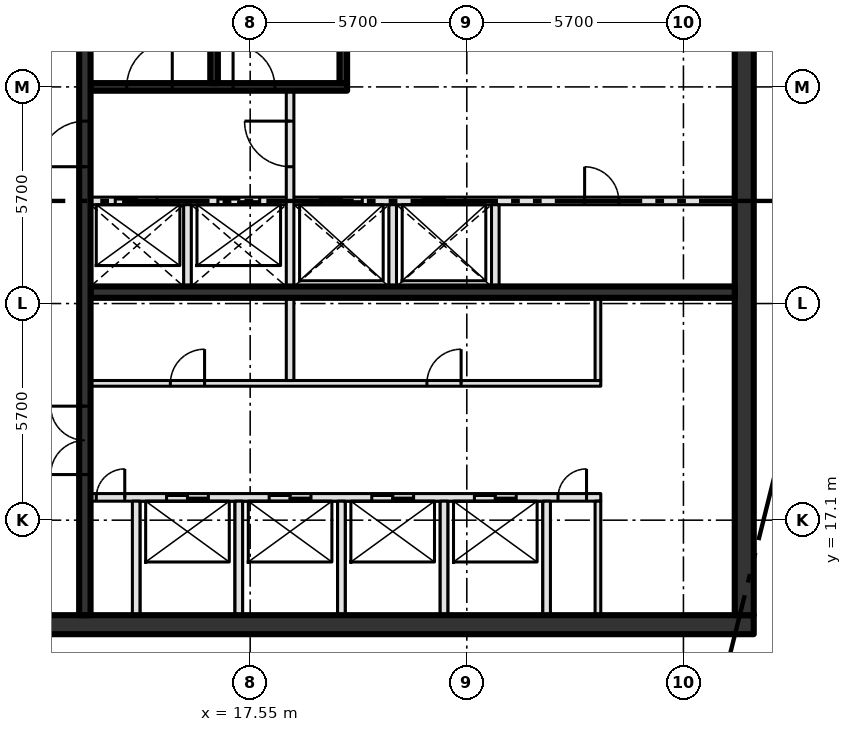
"""IFC4 building model, lengths in metres.
Left out: names, types, materials, properties, quantities, classifications, styles, units other than length and angle.
Written with IfcOpenShell. Run it as: python <this file> out.ifc"""

import sys

from ifc_helpers import new_model, si_unit, direction, frame, frame_2d, origin, place, context, subcontext, project, spatial, rectangle, extrude, element, fill, save


model = new_model("IFC4")
c1 = context("Model", 3, precision=1e-05, world=origin(), true_north=direction((0.0, 1.0)))
c2 = subcontext(c1, "Body", "Model", "MODEL_VIEW")
j1 = project(units=[si_unit("LENGTHUNIT", "METRE"), si_unit("PLANEANGLEUNIT", "RADIAN")], contexts=[c1])
p1 = place(None, origin())
s1 = spatial("IfcSite", under=j1, at=p1, CompositionType="ELEMENT")
p2 = place(p1, origin())
s2 = spatial("IfcBuilding", under=s1, at=p2, CompositionType="ELEMENT")
p3 = place(p2, frame((0.0, 0.0, 348.6)))
s3 = spatial("IfcBuildingStorey", under=s2, at=p3, CompositionType="ELEMENT", Elevation=348.6)
p4 = place(p3, frame((8.0, 14.35, -0.45), z_axis=(0.0, 0.0, 1.0), x_axis=(1.0, 0.0, 0.0)))
e1 = element("IfcWall", 1, at=p4, inside=s3, PredefinedType="SHEAR", context=c2, shape_type="SweptSolid", body=[
    extrude(rectangle(XDim=22.8, YDim=0.5, at=frame_2d((11.4, 0.0))), origin(), (0.0, 0.0, 1.0), 5.55),
])
p5 = place(p4, frame((2.3, 0.0, 0.45)))
e2 = element("IfcOpeningElement", 2, at=p5, cuts=e1, PredefinedType="OPENING", context=c2, shape_type="SweptSolid", body=[
    extrude(rectangle(XDim=1.8, YDim=2.1, at=frame_2d((0.9, 1.05))), frame((0.0, 0.26, 0.0), z_axis=(0.0, -1.0, 0.0), x_axis=(1.0, 0.0, 0.0)), (0.0, 0.0, 1.0), 0.52),
])
p6 = place(p3, frame((30.55, 14.6, -0.45), z_axis=(0.0, 0.0, 1.0), x_axis=(0.0, 1.0, 0.0)))
e3 = element("IfcWall", 3, at=p6, inside=s3, PredefinedType="SHEAR", context=c2, shape_type="SweptSolid", body=[
    extrude(rectangle(XDim=21.1, YDim=0.5, at=frame_2d((10.55, 0.0))), origin(), (0.0, 0.0, 1.0), 5.55),
])
p7 = place(p3, frame((13.35, 17.7, 0.0), z_axis=(0.0, 0.0, 1.0), x_axis=(1.0, 0.0, 0.0)))
e4 = element("IfcWall", 4, at=p7, inside=s3, PredefinedType="SOLIDWALL", context=c2, shape_type="SweptSolid", body=[
    extrude(rectangle(XDim=13.425, YDim=0.2, at=frame_2d((6.712, 0.0))), origin(), (0.0, 0.0, 1.0), 5.1),
])
p8 = place(p7, frame((2.0, 0.0, 0.0)))
e5 = element("IfcOpeningElement", 5, at=p8, cuts=e4, PredefinedType="OPENING", context=c2, shape_type="SweptSolid", body=[
    extrude(rectangle(XDim=1.1, YDim=2.1, at=frame_2d((0.55, 1.05))), frame((0.0, 0.11, 0.0), z_axis=(0.0, -1.0, 0.0), x_axis=(1.0, 0.0, 0.0)), (0.0, 0.0, 1.0), 0.22),
])
p9 = place(p7, frame((4.7, 0.0, 0.0)))
e6 = element("IfcOpeningElement", 6, at=p9, cuts=e4, PredefinedType="OPENING", context=c2, shape_type="SweptSolid", body=[
    extrude(rectangle(XDim=1.1, YDim=2.1, at=frame_2d((0.55, 1.05))), frame((0.0, 0.11, 0.0), z_axis=(0.0, -1.0, 0.0), x_axis=(1.0, 0.0, 0.0)), (0.0, 0.0, 1.0), 0.22),
])
p10 = place(p7, frame((7.4, 0.0, 0.0)))
e7 = element("IfcOpeningElement", 7, at=p10, cuts=e4, PredefinedType="OPENING", context=c2, shape_type="SweptSolid", body=[
    extrude(rectangle(XDim=1.1, YDim=2.1, at=frame_2d((0.55, 1.05))), frame((0.0, 0.11, 0.0), z_axis=(0.0, -1.0, 0.0), x_axis=(1.0, 0.0, 0.0)), (0.0, 0.0, 1.0), 0.22),
])
p11 = place(p7, frame((10.1, 0.0, 0.0)))
e8 = element("IfcOpeningElement", 8, at=p11, cuts=e4, PredefinedType="OPENING", context=c2, shape_type="SweptSolid", body=[
    extrude(rectangle(XDim=1.1, YDim=2.1, at=frame_2d((0.55, 1.05))), frame((0.0, 0.11, 0.0), z_axis=(0.0, -1.0, 0.0), x_axis=(1.0, 0.0, 0.0)), (0.0, 0.0, 1.0), 0.22),
])
p12 = place(p7, frame((0.15, 0.0, 0.0)))
e9 = element("IfcOpeningElement", 9, at=p12, cuts=e4, PredefinedType="OPENING", context=c2, shape_type="SweptSolid", body=[
    extrude(rectangle(XDim=0.75, YDim=2.1, at=frame_2d((0.375, 1.05))), frame((0.0, 0.11, 0.0), z_axis=(0.0, -1.0, 0.0), x_axis=(1.0, 0.0, 0.0)), (0.0, 0.0, 1.0), 0.22),
])
p13 = place(p7, frame((12.3, 0.0, 0.0)))
e10 = element("IfcOpeningElement", 10, at=p13, cuts=e4, PredefinedType="OPENING", context=c2, shape_type="SweptSolid", body=[
    extrude(rectangle(XDim=0.75, YDim=2.1, at=frame_2d((0.375, 1.05))), frame((0.0, 0.11, 0.0), z_axis=(0.0, -1.0, 0.0), x_axis=(1.0, 0.0, 0.0)), (0.0, 0.0, 1.0), 0.22),
])
p14 = place(p3, frame((13.35, 20.7, 0.0), z_axis=(0.0, 0.0, 1.0), x_axis=(1.0, 0.0, 0.0)))
e11 = element("IfcWall", 11, at=p14, inside=s3, PredefinedType="PARTITIONING", context=c2, shape_type="SweptSolid", body=[
    extrude(rectangle(XDim=13.425, YDim=0.15, at=frame_2d((6.712, 0.0))), origin(), (0.0, 0.0, 1.0), 5.1),
])
p15 = place(p14, frame((2.1, 0.0, 0.0)))
e12 = element("IfcOpeningElement", 12, at=p15, cuts=e11, PredefinedType="OPENING", context=c2, shape_type="SweptSolid", body=[
    extrude(rectangle(XDim=0.9, YDim=2.1, at=frame_2d((0.45, 1.05))), frame((0.0, 0.085, 0.0), z_axis=(0.0, -1.0, 0.0), x_axis=(1.0, 0.0, 0.0)), (0.0, 0.0, 1.0), 0.17),
])
p16 = place(p14, frame((8.85, 0.0, 0.0)))
e13 = element("IfcOpeningElement", 13, at=p16, cuts=e11, PredefinedType="OPENING", context=c2, shape_type="SweptSolid", body=[
    extrude(rectangle(XDim=0.9, YDim=2.1, at=frame_2d((0.45, 1.05))), frame((0.0, 0.085, 0.0), z_axis=(0.0, -1.0, 0.0), x_axis=(1.0, 0.0, 0.0)), (0.0, 0.0, 1.0), 0.17),
])
p17 = place(p3, frame((13.35, 23.1, 0.0), z_axis=(0.0, 0.0, 1.0), x_axis=(1.0, 0.0, 0.0)))
e14 = element("IfcWall", 14, at=p17, inside=s3, PredefinedType="SHEAR", context=c2, shape_type="SweptSolid", body=[
    extrude(rectangle(XDim=16.95, YDim=0.3, at=frame_2d((8.475, 0.0))), origin(), (0.0, 0.0, 1.0), 5.1),
])
p18 = place(p3, frame((13.35, 25.5, 0.0), z_axis=(0.0, 0.0, 1.0), x_axis=(1.0, 0.0, 0.0)))
e15 = element("IfcWall", 15, at=p18, inside=s3, PredefinedType="SOLIDWALL", context=c2, shape_type="SweptSolid", body=[
    extrude(rectangle(XDim=16.95, YDim=0.2, at=frame_2d((8.475, 0.0))), origin(), (0.0, 0.0, 1.0), 5.1),
])
p19 = place(p18, frame((0.65, 0.0, 0.0)))
e16 = element("IfcOpeningElement", 16, at=p19, cuts=e15, PredefinedType="OPENING", context=c2, shape_type="SweptSolid", body=[
    extrude(rectangle(XDim=1.1, YDim=2.1, at=frame_2d((0.55, 1.05))), frame((0.0, 0.11, 0.0), z_axis=(0.0, -1.0, 0.0), x_axis=(1.0, 0.0, 0.0)), (0.0, 0.0, 1.0), 0.22),
])
p20 = place(p18, frame((3.35, 0.0, 0.0)))
e17 = element("IfcOpeningElement", 17, at=p20, cuts=e15, PredefinedType="OPENING", context=c2, shape_type="SweptSolid", body=[
    extrude(rectangle(XDim=1.1, YDim=2.1, at=frame_2d((0.55, 1.05))), frame((0.0, 0.11, 0.0), z_axis=(0.0, -1.0, 0.0), x_axis=(1.0, 0.0, 0.0)), (0.0, 0.0, 1.0), 0.22),
])
p21 = place(p18, frame((6.05, 0.0, 0.0)))
e18 = element("IfcOpeningElement", 18, at=p21, cuts=e15, PredefinedType="OPENING", context=c2, shape_type="SweptSolid", body=[
    extrude(rectangle(XDim=1.1, YDim=2.1, at=frame_2d((0.55, 1.05))), frame((0.0, 0.11, 0.0), z_axis=(0.0, -1.0, 0.0), x_axis=(1.0, 0.0, 0.0)), (0.0, 0.0, 1.0), 0.22),
])
p22 = place(p18, frame((8.75, 0.0, 0.0)))
e19 = element("IfcOpeningElement", 19, at=p22, cuts=e15, PredefinedType="OPENING", context=c2, shape_type="SweptSolid", body=[
    extrude(rectangle(XDim=1.1, YDim=2.1, at=frame_2d((0.55, 1.05))), frame((0.0, 0.11, 0.0), z_axis=(0.0, -1.0, 0.0), x_axis=(1.0, 0.0, 0.0)), (0.0, 0.0, 1.0), 0.22),
])
p23 = place(p18, frame((13.0, 0.0, 0.0)))
e20 = element("IfcOpeningElement", 20, at=p23, cuts=e15, PredefinedType="OPENING", context=c2, shape_type="SweptSolid", body=[
    extrude(rectangle(XDim=0.9, YDim=2.1, at=frame_2d((0.45, 1.05))), frame((0.0, 0.11, 0.0), z_axis=(0.0, -1.0, 0.0), x_axis=(1.0, 0.0, 0.0)), (0.0, 0.0, 1.0), 0.22),
])
p24 = place(p3, frame((13.35, 28.5, 0.0), z_axis=(0.0, 0.0, 1.0), x_axis=(1.0, 0.0, 0.0)))
e21 = element("IfcWall", 21, at=p24, inside=s3, PredefinedType="SOLIDWALL", context=c2, shape_type="SweptSolid", body=[
    extrude(rectangle(XDim=6.75, YDim=0.2, at=frame_2d((3.375, 0.0))), origin(), (0.0, 0.0, 1.0), 5.1),
])
p25 = place(p24, frame((0.95, 0.0, 0.0)))
e22 = element("IfcOpeningElement", 22, at=p25, cuts=e21, PredefinedType="OPENING", context=c2, shape_type="SweptSolid", body=[
    extrude(rectangle(XDim=1.2, YDim=2.1, at=frame_2d((0.6, 1.05))), frame((0.0, 0.11, 0.0), z_axis=(0.0, -1.0, 0.0), x_axis=(1.0, 0.0, 0.0)), (0.0, 0.0, 1.0), 0.22),
])
p26 = place(p24, frame((3.75, 0.0, 0.0)))
e23 = element("IfcOpeningElement", 23, at=p26, cuts=e21, PredefinedType="OPENING", context=c2, shape_type="SweptSolid", body=[
    extrude(rectangle(XDim=1.1, YDim=2.1, at=frame_2d((0.55, 1.05))), frame((0.0, 0.11, 0.0), z_axis=(0.0, -1.0, 0.0), x_axis=(1.0, 0.0, 0.0)), (0.0, 0.0, 1.0), 0.22),
])
p27 = place(p3, frame((13.2, 14.6, 0.0), z_axis=(0.0, 0.0, 1.0), x_axis=(0.0, 1.0, 0.0)))
e24 = element("IfcWall", 24, at=p27, inside=s3, PredefinedType="SHEAR", context=c2, shape_type="SweptSolid", body=[
    extrude(rectangle(XDim=21.1, YDim=0.3, at=frame_2d((10.55, 0.0))), origin(), (0.0, 0.0, 1.0), 5.1),
])
p28 = place(p27, frame((3.7, 0.0, 0.0)))
e25 = element("IfcOpeningElement", 25, at=p28, cuts=e24, PredefinedType="OPENING", context=c2, shape_type="SweptSolid", body=[
    extrude(rectangle(XDim=1.8, YDim=2.1, at=frame_2d((0.9, 1.05))), frame((0.0, 0.16, 0.0), z_axis=(0.0, -1.0, 0.0), x_axis=(1.0, 0.0, 0.0)), (0.0, 0.0, 1.0), 0.32),
])
p29 = place(p27, frame((11.8, 0.0, 0.0)))
e26 = element("IfcOpeningElement", 26, at=p29, cuts=e24, PredefinedType="OPENING", context=c2, shape_type="SweptSolid", body=[
    extrude(rectangle(XDim=1.2, YDim=2.1, at=frame_2d((0.6, 1.05))), frame((0.0, 0.16, 0.0), z_axis=(0.0, -1.0, 0.0), x_axis=(1.0, 0.0, 0.0)), (0.0, 0.0, 1.0), 0.32),
])
p30 = place(p3, frame((14.55, 14.6, 0.0), z_axis=(0.0, 0.0, 1.0), x_axis=(0.0, 1.0, 0.0)))
e27 = element("IfcWall", 27, at=p30, inside=s3, PredefinedType="SOLIDWALL", context=c2, shape_type="SweptSolid", body=[
    extrude(rectangle(XDim=3.0, YDim=0.2, at=frame_2d((1.5, 0.0))), origin(), (0.0, 0.0, 1.0), 5.1),
])
p31 = place(p3, frame((15.9, 23.25, 0.0), z_axis=(0.0, 0.0, 1.0), x_axis=(0.0, 1.0, 0.0)))
e28 = element("IfcWall", 28, at=p31, inside=s3, PredefinedType="SOLIDWALL", context=c2, shape_type="SweptSolid", body=[
    extrude(rectangle(XDim=2.15, YDim=0.2, at=frame_2d((1.075, 0.0))), origin(), (0.0, 0.0, 1.0), 5.1),
])
p32 = place(p3, frame((16.6, 28.6, 0.0), z_axis=(0.0, 0.0, 1.0), x_axis=(0.0, 1.0, 0.0)))
e29 = element("IfcWall", 29, at=p32, inside=s3, PredefinedType="SOLIDWALL", context=c2, shape_type="SweptSolid", body=[
    extrude(rectangle(XDim=7.1, YDim=0.2, at=frame_2d((3.55, 0.0))), origin(), (0.0, 0.0, 1.0), 5.1),
])
p33 = place(p3, frame((17.25, 14.6, 0.0), z_axis=(0.0, 0.0, 1.0), x_axis=(0.0, 1.0, 0.0)))
e30 = element("IfcWall", 30, at=p33, inside=s3, PredefinedType="SOLIDWALL", context=c2, shape_type="SweptSolid", body=[
    extrude(rectangle(XDim=3.0, YDim=0.2, at=frame_2d((1.5, 0.0))), origin(), (0.0, 0.0, 1.0), 5.1),
])
p34 = place(p3, frame((18.6, 20.775, 0.0), z_axis=(0.0, 0.0, 1.0), x_axis=(0.0, 1.0, 0.0)))
e31 = element("IfcWall", 31, at=p34, inside=s3, PredefinedType="SOLIDWALL", context=c2, shape_type="SweptSolid", body=[
    extrude(rectangle(XDim=7.625, YDim=0.2, at=frame_2d((3.812, 0.0))), origin(), (0.0, 0.0, 1.0), 5.1),
])
p35 = place(p34, frame((5.625, 0.0, 0.0)))
e32 = element("IfcOpeningElement", 32, at=p35, cuts=e31, PredefinedType="OPENING", context=c2, shape_type="SweptSolid", body=[
    extrude(rectangle(XDim=1.2, YDim=2.1, at=frame_2d((0.6, 1.05))), frame((0.0, 0.11, 0.0), z_axis=(0.0, -1.0, 0.0), x_axis=(1.0, 0.0, 0.0)), (0.0, 0.0, 1.0), 0.22),
])
p36 = place(p3, frame((19.95, 14.6, 0.0), z_axis=(0.0, 0.0, 1.0), x_axis=(0.0, 1.0, 0.0)))
e33 = element("IfcWall", 33, at=p36, inside=s3, PredefinedType="SOLIDWALL", context=c2, shape_type="SweptSolid", body=[
    extrude(rectangle(XDim=3.0, YDim=0.2, at=frame_2d((1.5, 0.0))), origin(), (0.0, 0.0, 1.0), 5.1),
])
p37 = place(p3, frame((20.0, 28.6, 0.0), z_axis=(0.0, 0.0, 1.0), x_axis=(0.0, 1.0, 0.0)))
e34 = element("IfcWall", 34, at=p37, inside=s3, PredefinedType="SOLIDWALL", context=c2, shape_type="SweptSolid", body=[
    extrude(rectangle(XDim=7.1, YDim=0.2, at=frame_2d((3.55, 0.0))), origin(), (0.0, 0.0, 1.0), 5.1),
])
p38 = place(p3, frame((21.3, 23.25, 0.0), z_axis=(0.0, 0.0, 1.0), x_axis=(0.0, 1.0, 0.0)))
e35 = element("IfcWall", 35, at=p38, inside=s3, PredefinedType="SOLIDWALL", context=c2, shape_type="SweptSolid", body=[
    extrude(rectangle(XDim=2.15, YDim=0.2, at=frame_2d((1.075, 0.0))), origin(), (0.0, 0.0, 1.0), 5.1),
])
p39 = place(p3, frame((22.65, 14.6, 0.0), z_axis=(0.0, 0.0, 1.0), x_axis=(0.0, 1.0, 0.0)))
e36 = element("IfcWall", 36, at=p39, inside=s3, PredefinedType="SOLIDWALL", context=c2, shape_type="SweptSolid", body=[
    extrude(rectangle(XDim=3.0, YDim=0.2, at=frame_2d((1.5, 0.0))), origin(), (0.0, 0.0, 1.0), 5.1),
])
p40 = place(p3, frame((24.0, 23.25, 0.0), z_axis=(0.0, 0.0, 1.0), x_axis=(0.0, 1.0, 0.0)))
e37 = element("IfcWall", 37, at=p40, inside=s3, PredefinedType="SOLIDWALL", context=c2, shape_type="SweptSolid", body=[
    extrude(rectangle(XDim=2.15, YDim=0.2, at=frame_2d((1.075, 0.0))), origin(), (0.0, 0.0, 1.0), 5.1),
])
p41 = place(p3, frame((25.35, 14.6, 0.0), z_axis=(0.0, 0.0, 1.0), x_axis=(0.0, 1.0, 0.0)))
e38 = element("IfcWall", 38, at=p41, inside=s3, PredefinedType="SOLIDWALL", context=c2, shape_type="SweptSolid", body=[
    extrude(rectangle(XDim=3.0, YDim=0.2, at=frame_2d((1.5, 0.0))), origin(), (0.0, 0.0, 1.0), 5.1),
])
p42 = place(p3, frame((26.7, 14.6, 0.0), z_axis=(0.0, 0.0, 1.0), x_axis=(0.0, 1.0, 0.0)))
e39 = element("IfcWall", 39, at=p42, inside=s3, PredefinedType="PARTITIONING", context=c2, shape_type="SweptSolid", body=[
    extrude(rectangle(XDim=3.0, YDim=0.15, at=frame_2d((1.5, 0.0))), origin(), (0.0, 0.0, 1.0), 5.1),
])
p43 = place(p3, frame((26.7, 20.775, 0.0), z_axis=(0.0, 0.0, 1.0), x_axis=(0.0, 1.0, 0.0)))
e40 = element("IfcWall", 40, at=p43, inside=s3, PredefinedType="PARTITIONING", context=c2, shape_type="SweptSolid", body=[
    extrude(rectangle(XDim=2.175, YDim=0.15, at=frame_2d((1.087, 0.0))), origin(), (0.0, 0.0, 1.0), 5.1),
])
p44 = place(p8, origin())
e41 = element("IfcDoor", 41, at=p44, inside=s3, OperationType="SLIDING_TO_LEFT", PredefinedType="DOOR", context=c2, shape_type="SweptSolid", body=[
    extrude(rectangle(XDim=1.1, YDim=2.1, at=frame_2d((0.55, 1.05))), frame((0.0, 0.025, 0.0), z_axis=(0.0, -1.0, 0.0), x_axis=(1.0, 0.0, 0.0)), (0.0, 0.0, 1.0), 0.05),
])
fill(e5, e41)
p45 = place(p9, origin())
e42 = element("IfcDoor", 42, at=p45, inside=s3, OperationType="SLIDING_TO_LEFT", PredefinedType="DOOR", context=c2, shape_type="SweptSolid", body=[
    extrude(rectangle(XDim=1.1, YDim=2.1, at=frame_2d((0.55, 1.05))), frame((0.0, 0.025, 0.0), z_axis=(0.0, -1.0, 0.0), x_axis=(1.0, 0.0, 0.0)), (0.0, 0.0, 1.0), 0.05),
])
fill(e6, e42)
p46 = place(p10, origin())
e43 = element("IfcDoor", 43, at=p46, inside=s3, OperationType="SLIDING_TO_LEFT", PredefinedType="DOOR", context=c2, shape_type="SweptSolid", body=[
    extrude(rectangle(XDim=1.1, YDim=2.1, at=frame_2d((0.55, 1.05))), frame((0.0, 0.025, 0.0), z_axis=(0.0, -1.0, 0.0), x_axis=(1.0, 0.0, 0.0)), (0.0, 0.0, 1.0), 0.05),
])
fill(e7, e43)
p47 = place(p11, origin())
e44 = element("IfcDoor", 44, at=p47, inside=s3, OperationType="SLIDING_TO_LEFT", PredefinedType="DOOR", context=c2, shape_type="SweptSolid", body=[
    extrude(rectangle(XDim=1.1, YDim=2.1, at=frame_2d((0.55, 1.05))), frame((0.0, 0.025, 0.0), z_axis=(0.0, -1.0, 0.0), x_axis=(1.0, 0.0, 0.0)), (0.0, 0.0, 1.0), 0.05),
])
fill(e8, e44)
p48 = place(p19, origin())
e45 = element("IfcDoor", 45, at=p48, inside=s3, OperationType="SLIDING_TO_LEFT", PredefinedType="DOOR", context=c2, shape_type="SweptSolid", body=[
    extrude(rectangle(XDim=1.1, YDim=2.1, at=frame_2d((0.55, 1.05))), frame((0.0, 0.025, 0.0), z_axis=(0.0, -1.0, 0.0), x_axis=(1.0, 0.0, 0.0)), (0.0, 0.0, 1.0), 0.05),
])
fill(e16, e45)
p49 = place(p20, origin())
e46 = element("IfcDoor", 46, at=p49, inside=s3, OperationType="SLIDING_TO_LEFT", PredefinedType="DOOR", context=c2, shape_type="SweptSolid", body=[
    extrude(rectangle(XDim=1.1, YDim=2.1, at=frame_2d((0.55, 1.05))), frame((0.0, 0.025, 0.0), z_axis=(0.0, -1.0, 0.0), x_axis=(1.0, 0.0, 0.0)), (0.0, 0.0, 1.0), 0.05),
])
fill(e17, e46)
p50 = place(p21, origin())
e47 = element("IfcDoor", 47, at=p50, inside=s3, OperationType="SLIDING_TO_LEFT", PredefinedType="DOOR", context=c2, shape_type="SweptSolid", body=[
    extrude(rectangle(XDim=1.1, YDim=2.1, at=frame_2d((0.55, 1.05))), frame((0.0, 0.025, 0.0), z_axis=(0.0, -1.0, 0.0), x_axis=(1.0, 0.0, 0.0)), (0.0, 0.0, 1.0), 0.05),
])
fill(e18, e47)
p51 = place(p22, origin())
e48 = element("IfcDoor", 48, at=p51, inside=s3, OperationType="SLIDING_TO_LEFT", PredefinedType="DOOR", context=c2, shape_type="SweptSolid", body=[
    extrude(rectangle(XDim=1.1, YDim=2.1, at=frame_2d((0.55, 1.05))), frame((0.0, 0.025, 0.0), z_axis=(0.0, -1.0, 0.0), x_axis=(1.0, 0.0, 0.0)), (0.0, 0.0, 1.0), 0.05),
])
fill(e19, e48)
p52 = place(p12, origin())
e49 = element("IfcDoor", 49, at=p52, inside=s3, OperationType="SINGLE_SWING_RIGHT", PredefinedType="DOOR", context=c2, shape_type="SweptSolid", body=[
    extrude(rectangle(XDim=0.75, YDim=2.1, at=frame_2d((0.375, 1.05))), frame((0.0, 0.025, 0.0), z_axis=(0.0, -1.0, 0.0), x_axis=(1.0, 0.0, 0.0)), (0.0, 0.0, 1.0), 0.05),
])
fill(e9, e49)
p53 = place(p13, origin())
e50 = element("IfcDoor", 50, at=p53, inside=s3, OperationType="SINGLE_SWING_RIGHT", PredefinedType="DOOR", context=c2, shape_type="SweptSolid", body=[
    extrude(rectangle(XDim=0.75, YDim=2.1, at=frame_2d((0.375, 1.05))), frame((0.0, 0.025, 0.0), z_axis=(0.0, -1.0, 0.0), x_axis=(1.0, 0.0, 0.0)), (0.0, 0.0, 1.0), 0.05),
])
fill(e10, e50)
p54 = place(p15, origin())
e51 = element("IfcDoor", 51, at=p54, inside=s3, OperationType="SINGLE_SWING_RIGHT", PredefinedType="DOOR", context=c2, shape_type="SweptSolid", body=[
    extrude(rectangle(XDim=0.9, YDim=2.1, at=frame_2d((0.45, 1.05))), frame((0.0, 0.025, 0.0), z_axis=(0.0, -1.0, 0.0), x_axis=(1.0, 0.0, 0.0)), (0.0, 0.0, 1.0), 0.05),
])
fill(e12, e51)
p55 = place(p16, origin())
e52 = element("IfcDoor", 52, at=p55, inside=s3, OperationType="SINGLE_SWING_RIGHT", PredefinedType="DOOR", context=c2, shape_type="SweptSolid", body=[
    extrude(rectangle(XDim=0.9, YDim=2.1, at=frame_2d((0.45, 1.05))), frame((0.0, 0.025, 0.0), z_axis=(0.0, -1.0, 0.0), x_axis=(1.0, 0.0, 0.0)), (0.0, 0.0, 1.0), 0.05),
])
fill(e13, e52)
p56 = place(p23, origin())
e53 = element("IfcDoor", 53, at=p56, inside=s3, OperationType="SINGLE_SWING_LEFT", PredefinedType="DOOR", context=c2, shape_type="SweptSolid", body=[
    extrude(rectangle(XDim=0.9, YDim=2.1, at=frame_2d((0.45, 1.05))), frame((0.0, 0.025, 0.0), z_axis=(0.0, -1.0, 0.0), x_axis=(1.0, 0.0, 0.0)), (0.0, 0.0, 1.0), 0.05),
])
fill(e20, e53)
p57 = place(p25, origin())
e54 = element("IfcDoor", 54, at=p57, inside=s3, OperationType="SINGLE_SWING_RIGHT", PredefinedType="DOOR", context=c2, shape_type="SweptSolid", body=[
    extrude(rectangle(XDim=1.2, YDim=2.1, at=frame_2d((0.6, 1.05))), frame((0.0, 0.025, 0.0), z_axis=(0.0, -1.0, 0.0), x_axis=(1.0, 0.0, 0.0)), (0.0, 0.0, 1.0), 0.05),
])
fill(e22, e54)
p58 = place(p26, origin())
e55 = element("IfcDoor", 55, at=p58, inside=s3, OperationType="SINGLE_SWING_LEFT", PredefinedType="DOOR", context=c2, shape_type="SweptSolid", body=[
    extrude(rectangle(XDim=1.1, YDim=2.1, at=frame_2d((0.55, 1.05))), frame((0.0, 0.025, 0.0), z_axis=(0.0, -1.0, 0.0), x_axis=(1.0, 0.0, 0.0)), (0.0, 0.0, 1.0), 0.05),
])
fill(e23, e55)
p59 = place(p28, origin())
e56 = element("IfcDoor", 56, at=p59, inside=s3, OperationType="DOUBLE_DOOR_SINGLE_SWING", PredefinedType="DOOR", context=c2, shape_type="SweptSolid", body=[
    extrude(rectangle(XDim=1.8, YDim=2.1, at=frame_2d((0.9, 1.05))), frame((0.0, 0.025, 0.0), z_axis=(0.0, -1.0, 0.0), x_axis=(1.0, 0.0, 0.0)), (0.0, 0.0, 1.0), 0.05),
])
fill(e25, e56)
p60 = place(p29, origin())
e57 = element("IfcDoor", 57, at=p60, inside=s3, OperationType="SINGLE_SWING_LEFT", PredefinedType="DOOR", context=c2, shape_type="SweptSolid", body=[
    extrude(rectangle(XDim=1.2, YDim=2.1, at=frame_2d((0.6, 1.05))), frame((0.0, 0.025, 0.0), z_axis=(0.0, -1.0, 0.0), x_axis=(1.0, 0.0, 0.0)), (0.0, 0.0, 1.0), 0.05),
])
fill(e26, e57)
p61 = place(p35, origin())
e58 = element("IfcDoor", 58, at=p61, inside=s3, OperationType="SINGLE_SWING_RIGHT", PredefinedType="DOOR", context=c2, shape_type="SweptSolid", body=[
    extrude(rectangle(XDim=1.2, YDim=2.1, at=frame_2d((0.6, 1.05))), frame((0.0, 0.025, 0.0), z_axis=(0.0, -1.0, 0.0), x_axis=(1.0, 0.0, 0.0)), (0.0, 0.0, 1.0), 0.05),
])
fill(e32, e58)
save(model, sys.argv[1])
